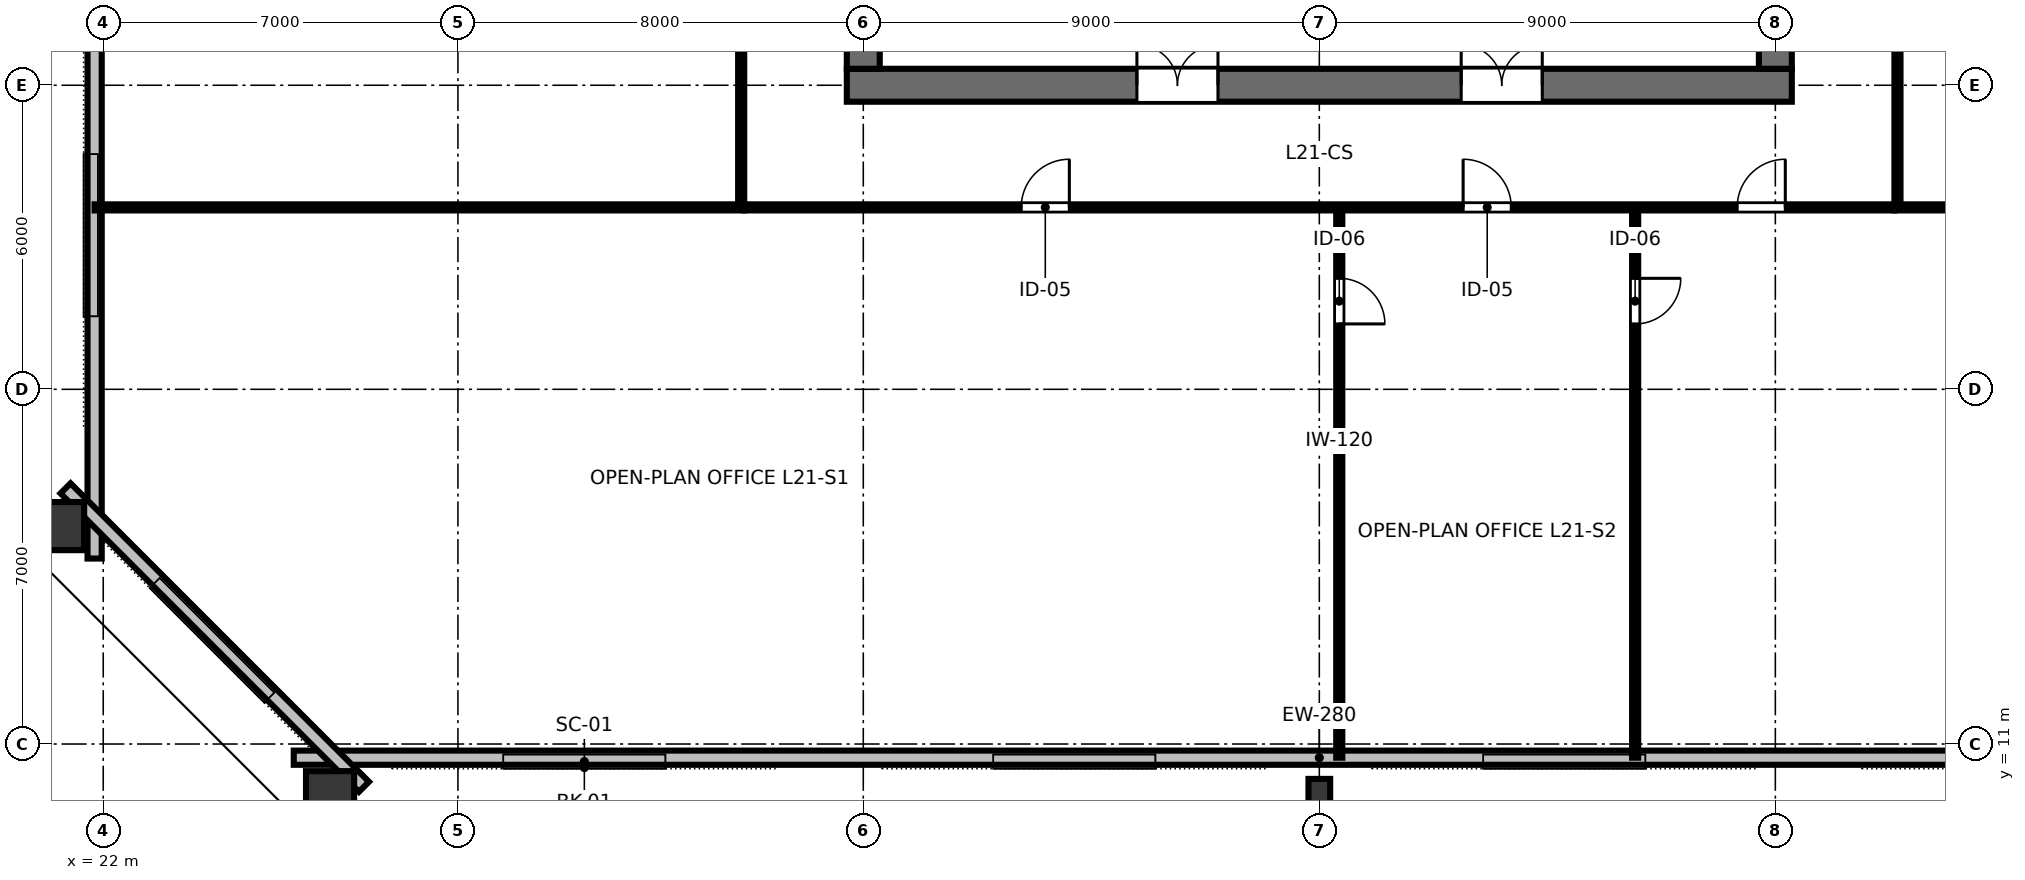
"""IFC4 building model, lengths in metres.
Left out: names, types, materials, properties, quantities, classifications, styles, units other than length and angle.
Written with IfcOpenShell. Run it as: python <this file> out.ifc"""

import sys

from ifc_helpers import new_model, si_unit, direction, frame, frame_2d, origin, origin_2d, place, context, subcontext, project, spatial, rectangle, hollow_rectangle, i_section, extrude, element, fill, save


model = new_model("IFC4")
c1 = context("Model", 3, precision=1e-05, world=origin(), true_north=direction((0.0, 1.0)))
c2 = subcontext(c1, "Body", "Model", "MODEL_VIEW")
j1 = project(units=[si_unit("LENGTHUNIT", "METRE"), si_unit("PLANEANGLEUNIT", "RADIAN")], contexts=[c1])
p1 = place(None, origin())
s1 = spatial("IfcSite", under=j1, at=p1, CompositionType="ELEMENT")
p2 = place(p1, origin())
s2 = spatial("IfcBuilding", under=s1, at=p2, CompositionType="ELEMENT")
p3 = place(p2, frame((0.0, 0.0, 82.0)))
s3 = spatial("IfcBuildingStorey", under=s2, at=p3, CompositionType="ELEMENT", Elevation=82.0)
p4 = place(p3, frame((36.675, 24.0, 0.0), z_axis=(0.0, 0.0, 1.0), x_axis=(1.0, 0.0, 0.0)))
e1 = element("IfcWall", 1, at=p4, inside=s3, PredefinedType="SHEAR", context=c2, shape_type="SweptSolid", body=[
    extrude(rectangle(XDim=18.65, YDim=0.65, at=frame_2d((9.325, 0.0))), origin(), (0.0, 0.0, 1.0), 3.28),
])
p5 = place(p4, frame((5.725, 0.0, 0.0)))
e2 = element("IfcOpeningElement", 2, at=p5, cuts=e1, PredefinedType="OPENING", context=c2, shape_type="SweptSolid", body=[
    extrude(rectangle(XDim=1.6, YDim=2.15, at=frame_2d((0.8, 1.075))), frame((0.0, 0.335, 0.0), z_axis=(0.0, -1.0, 0.0), x_axis=(1.0, 0.0, 0.0)), (0.0, 0.0, 1.0), 0.67),
])
p6 = place(p4, frame((12.125, 0.0, 0.0)))
e3 = element("IfcOpeningElement", 3, at=p6, cuts=e1, PredefinedType="OPENING", context=c2, shape_type="SweptSolid", body=[
    extrude(rectangle(XDim=1.6, YDim=2.15, at=frame_2d((0.8, 1.075))), frame((0.0, 0.335, 0.0), z_axis=(0.0, -1.0, 0.0), x_axis=(1.0, 0.0, 0.0)), (0.0, 0.0, 1.0), 0.67),
])
p7 = place(p3, frame((37.0, 24.325, 0.0), z_axis=(0.0, 0.0, 1.0), x_axis=(0.0, 1.0, 0.0)))
e4 = element("IfcWall", 4, at=p7, inside=s3, PredefinedType="SHEAR", context=c2, shape_type="SweptSolid", body=[
    extrude(rectangle(XDim=15.35, YDim=0.65, at=frame_2d((7.675, 0.0))), origin(), (0.0, 0.0, 1.0), 3.28),
])
p8 = place(p7, frame((5.2, 0.0, 0.0)))
e5 = element("IfcOpeningElement", 5, at=p8, cuts=e4, PredefinedType="OPENING", context=c2, shape_type="SweptSolid", body=[
    extrude(rectangle(XDim=1.15, YDim=2.15, at=frame_2d((0.575, 1.075))), frame((0.0, 0.335, 0.0), z_axis=(0.0, -1.0, 0.0), x_axis=(1.0, 0.0, 0.0)), (0.0, 0.0, 1.0), 0.67),
])
p9 = place(p3, frame((55.0, 24.325, 0.0), z_axis=(0.0, 0.0, 1.0), x_axis=(0.0, 1.0, 0.0)))
e6 = element("IfcWall", 6, at=p9, inside=s3, PredefinedType="SHEAR", context=c2, shape_type="SweptSolid", body=[
    extrude(rectangle(XDim=15.35, YDim=0.65, at=frame_2d((7.675, 0.0))), origin(), (0.0, 0.0, 1.0), 3.28),
])
p10 = place(p9, frame((5.2, 0.0, 0.0)))
e7 = element("IfcOpeningElement", 7, at=p10, cuts=e6, PredefinedType="OPENING", context=c2, shape_type="SweptSolid", body=[
    extrude(rectangle(XDim=1.15, YDim=2.15, at=frame_2d((0.575, 1.075))), frame((0.0, 0.335, 0.0), z_axis=(0.0, -1.0, 0.0), x_axis=(1.0, 0.0, 0.0)), (0.0, 0.0, 1.0), 0.67),
])
p11 = place(p3, frame((26.477, 9.89, 0.0), z_axis=(0.080491878848, 0.056033020634, 0.99517905828), x_axis=(-0.571330166379, 0.82072031837, 0.0)))
e8 = element("IfcColumn", 8, at=p11, inside=s3, PredefinedType="COLUMN", context=c2, shape_type="SweptSolid", body=[
    extrude(hollow_rectangle(XDim=0.95, YDim=1.15, WallThickness=0.06, at=origin_2d()), origin(), (0.0, 0.0, 1.0), 3.294),
])
p12 = place(p3, frame((46.0, 10.07, 0.0), z_axis=(0.0, 0.055844793021, 0.998439461907), x_axis=(-1.0, 0.0, 0.0)))
e9 = element("IfcColumn", 9, at=p12, inside=s3, PredefinedType="COLUMN", context=c2, shape_type="SweptSolid", body=[
    extrude(i_section(OverallWidth=0.428, OverallDepth=0.483, WebThickness=0.051, FlangeThickness=0.082, FilletRadius=0.025, at=origin_2d()), origin(), (0.0, 0.0, 1.0), 3.283),
])
p13 = place(p3, frame((21.048, 15.301, 0.0), z_axis=(0.066122964366, 0.070348310744, 0.995328523031), x_axis=(-0.6816861236, -0.725246783964, 0.096546005827)))
e10 = element("IfcColumn", 10, at=p13, inside=s3, PredefinedType="COLUMN", context=c2, shape_type="SweptSolid", body=[
    extrude(hollow_rectangle(XDim=0.95, YDim=1.15, WallThickness=0.06, at=origin_2d()), origin(), (0.0, 0.0, 1.0), 3.293),
])
p14 = place(p3, frame((25.76, 10.73, 0.0), z_axis=(0.0, 0.0, 1.0), x_axis=(1.0, 0.0, 0.0)))
e11 = element("IfcWall", 11, at=p14, inside=s3, PredefinedType="STANDARD", context=c2, shape_type="SweptSolid", body=[
    extrude(rectangle(XDim=40.48, YDim=0.28, at=frame_2d((20.24, 0.0))), origin(), (0.0, 0.0, 1.0), 3.28),
])
p15 = place(p3, frame((21.83, 49.34, 0.0), z_axis=(0.0, 0.0, 1.0), x_axis=(0.0, -1.0, 0.0)))
e12 = element("IfcWall", 12, at=p15, inside=s3, PredefinedType="STANDARD", context=c2, shape_type="SweptSolid", body=[
    extrude(rectangle(XDim=34.68, YDim=0.28, at=frame_2d((17.34, 0.0))), origin(), (0.0, 0.0, 1.0), 3.28),
])
p16 = place(p3, frame((21.256, 16.045, 0.0), z_axis=(0.0, 0.0, 1.0), x_axis=(0.707106781187, -0.707106781187, 0.0)))
e13 = element("IfcWall", 13, at=p16, inside=s3, PredefinedType="STANDARD", context=c2, shape_type="SweptSolid", body=[
    extrude(rectangle(XDim=8.329, YDim=0.28, at=frame_2d((4.165, 0.0))), origin(), (0.0, 0.0, 1.0), 2.343),
])
p17 = place(p3, frame((46.394, 21.59, 0.0), z_axis=(0.0, 0.0, 1.0), x_axis=(0.0, -1.0, 0.0)))
e14 = element("IfcWall", 14, at=p17, inside=s3, PredefinedType="PARTITIONING", context=c2, shape_type="SweptSolid", body=[
    extrude(rectangle(XDim=10.86, YDim=0.12, at=frame_2d((5.43, 0.0))), origin(), (0.0, 0.0, 1.0), 2.56),
])
p18 = place(p17, frame((1.4, 0.0, 0.0)))
e15 = element("IfcOpeningElement", 15, at=p18, cuts=e14, PredefinedType="OPENING", context=c2, shape_type="SweptSolid", body=[
    extrude(rectangle(XDim=0.9, YDim=2.15, at=frame_2d((0.45, 1.075))), frame((0.0, 0.07, 0.0), z_axis=(0.0, -1.0, 0.0), x_axis=(1.0, 0.0, 0.0)), (0.0, 0.0, 1.0), 0.14),
])
p19 = place(p3, frame((52.233, 21.59, 0.0), z_axis=(0.0, 0.0, 1.0), x_axis=(0.0, -1.0, 0.0)))
e16 = element("IfcWall", 16, at=p19, inside=s3, PredefinedType="PARTITIONING", context=c2, shape_type="SweptSolid", body=[
    extrude(rectangle(XDim=10.86, YDim=0.12, at=frame_2d((5.43, 0.0))), origin(), (0.0, 0.0, 1.0), 2.56),
])
p20 = place(p19, frame((1.4, 0.0, 0.0)))
e17 = element("IfcOpeningElement", 17, at=p20, cuts=e16, PredefinedType="OPENING", context=c2, shape_type="SweptSolid", body=[
    extrude(rectangle(XDim=0.9, YDim=2.15, at=frame_2d((0.45, 1.075))), frame((0.0, 0.07, 0.0), z_axis=(0.0, -1.0, 0.0), x_axis=(1.0, 0.0, 0.0)), (0.0, 0.0, 1.0), 0.14),
])
p21 = place(p3, frame((34.65, 21.59, 0.0), z_axis=(0.0, 0.0, 1.0), x_axis=(1.0, 0.0, 0.0)))
e18 = element("IfcWall", 18, at=p21, inside=s3, PredefinedType="PARTITIONING", context=c2, shape_type="SweptSolid", body=[
    extrude(rectangle(XDim=22.7, YDim=0.12, at=frame_2d((11.35, 0.0))), origin(), (0.0, 0.0, 1.0), 2.56),
])
p22 = place(p21, frame((5.467, 0.0, 0.0)))
e19 = element("IfcOpeningElement", 19, at=p22, cuts=e18, PredefinedType="OPENING", context=c2, shape_type="SweptSolid", body=[
    extrude(rectangle(XDim=0.95, YDim=2.15, at=frame_2d((0.475, 1.075))), frame((0.0, 0.07, 0.0), z_axis=(0.0, -1.0, 0.0), x_axis=(1.0, 0.0, 0.0)), (0.0, 0.0, 1.0), 0.14),
])
p23 = place(p21, frame((14.188, 0.0, 0.0)))
e20 = element("IfcOpeningElement", 20, at=p23, cuts=e18, PredefinedType="OPENING", context=c2, shape_type="SweptSolid", body=[
    extrude(rectangle(XDim=0.95, YDim=2.15, at=frame_2d((0.475, 1.075))), frame((0.0, 0.07, 0.0), z_axis=(0.0, -1.0, 0.0), x_axis=(1.0, 0.0, 0.0)), (0.0, 0.0, 1.0), 0.14),
])
p24 = place(p21, frame((19.596, 0.0, 0.0)))
e21 = element("IfcOpeningElement", 21, at=p24, cuts=e18, PredefinedType="OPENING", context=c2, shape_type="SweptSolid", body=[
    extrude(rectangle(XDim=0.95, YDim=2.15, at=frame_2d((0.475, 1.075))), frame((0.0, 0.07, 0.0), z_axis=(0.0, -1.0, 0.0), x_axis=(1.0, 0.0, 0.0)), (0.0, 0.0, 1.0), 0.14),
])
p25 = place(p3, frame((34.59, 21.65, 0.0), z_axis=(0.0, 0.0, 1.0), x_axis=(0.0, 1.0, 0.0)))
e22 = element("IfcWall", 22, at=p25, inside=s3, PredefinedType="PARTITIONING", context=c2, shape_type="SweptSolid", body=[
    extrude(rectangle(XDim=20.7, YDim=0.12, at=frame_2d((10.35, 0.0))), origin(), (0.0, 0.0, 1.0), 2.56),
])
p26 = place(p25, frame((9.875, 0.0, 0.0)))
e23 = element("IfcOpeningElement", 23, at=p26, cuts=e22, PredefinedType="OPENING", context=c2, shape_type="SweptSolid", body=[
    extrude(rectangle(XDim=0.95, YDim=2.15, at=frame_2d((0.475, 1.075))), frame((0.0, 0.07, 0.0), z_axis=(0.0, -1.0, 0.0), x_axis=(1.0, 0.0, 0.0)), (0.0, 0.0, 1.0), 0.14),
])
p27 = place(p3, frame((57.41, 21.65, 0.0), z_axis=(0.0, 0.0, 1.0), x_axis=(0.0, 1.0, 0.0)))
e24 = element("IfcWall", 24, at=p27, inside=s3, PredefinedType="PARTITIONING", context=c2, shape_type="SweptSolid", body=[
    extrude(rectangle(XDim=20.7, YDim=0.12, at=frame_2d((10.35, 0.0))), origin(), (0.0, 0.0, 1.0), 2.56),
])
p28 = place(p27, frame((6.128, 0.0, 0.0)))
e25 = element("IfcOpeningElement", 25, at=p28, cuts=e24, PredefinedType="OPENING", context=c2, shape_type="SweptSolid", body=[
    extrude(rectangle(XDim=0.95, YDim=2.15, at=frame_2d((0.475, 1.075))), frame((0.0, 0.07, 0.0), z_axis=(0.0, -1.0, 0.0), x_axis=(1.0, 0.0, 0.0)), (0.0, 0.0, 1.0), 0.14),
])
p29 = place(p27, frame((16.278, 0.0, 0.0)))
e26 = element("IfcOpeningElement", 26, at=p29, cuts=e24, PredefinedType="OPENING", context=c2, shape_type="SweptSolid", body=[
    extrude(rectangle(XDim=0.95, YDim=2.15, at=frame_2d((0.475, 1.075))), frame((0.0, 0.07, 0.0), z_axis=(0.0, -1.0, 0.0), x_axis=(1.0, 0.0, 0.0)), (0.0, 0.0, 1.0), 0.14),
])
for number, where, z_axis, x_axis in (
    (27, (34.65, 21.59, 0.0), (0.0, 0.0, 1.0), (-1.0, 0.0, 0.0)),
    (28, (57.35, 21.59, 0.0), (0.0, 0.0, 1.0), (1.0, 0.0, 0.0)),
):
    element("IfcWall", number, at=place(p3, frame(where, z_axis=z_axis, x_axis=x_axis)), inside=s3, PredefinedType="PARTITIONING", context=c2, shape_type="SweptSolid", body=[
        extrude(rectangle(XDim=12.82, YDim=0.12, at=frame_2d((6.41, 0.0))), origin(), (0.0, 0.0, 1.0), 2.56),
    ])
p30 = place(p5, origin())
e29 = element("IfcDoor", 29, at=p30, inside=s3, OperationType="DOUBLE_DOOR_SINGLE_SWING", PredefinedType="DOOR", context=c2, shape_type="SweptSolid", body=[
    extrude(rectangle(XDim=1.6, YDim=2.15, at=frame_2d((0.8, 1.075))), frame((0.0, 0.025, 0.0), z_axis=(0.0, -1.0, 0.0), x_axis=(1.0, 0.0, 0.0)), (0.0, 0.0, 1.0), 0.05),
])
fill(e2, e29)
p31 = place(p6, origin())
e30 = element("IfcDoor", 30, at=p31, inside=s3, OperationType="DOUBLE_DOOR_SINGLE_SWING", PredefinedType="DOOR", context=c2, shape_type="SweptSolid", body=[
    extrude(rectangle(XDim=1.6, YDim=2.15, at=frame_2d((0.8, 1.075))), frame((0.0, 0.025, 0.0), z_axis=(0.0, -1.0, 0.0), x_axis=(1.0, 0.0, 0.0)), (0.0, 0.0, 1.0), 0.05),
])
fill(e3, e30)
p32 = place(p18, origin())
e31 = element("IfcDoor", 31, at=p32, inside=s3, OperationType="SINGLE_SWING_RIGHT", PredefinedType="DOOR", context=c2, shape_type="SweptSolid", body=[
    extrude(rectangle(XDim=0.9, YDim=2.15, at=frame_2d((0.45, 1.075))), frame((0.0, 0.025, 0.0), z_axis=(0.0, -1.0, 0.0), x_axis=(1.0, 0.0, 0.0)), (0.0, 0.0, 1.0), 0.05),
])
fill(e15, e31)
p33 = place(p20, origin())
e32 = element("IfcDoor", 32, at=p33, inside=s3, OperationType="SINGLE_SWING_LEFT", PredefinedType="DOOR", context=c2, shape_type="SweptSolid", body=[
    extrude(rectangle(XDim=0.9, YDim=2.15, at=frame_2d((0.45, 1.075))), frame((0.0, 0.025, 0.0), z_axis=(0.0, -1.0, 0.0), x_axis=(1.0, 0.0, 0.0)), (0.0, 0.0, 1.0), 0.05),
])
fill(e17, e32)
p34 = place(p22, origin())
e33 = element("IfcDoor", 33, at=p34, inside=s3, OperationType="SINGLE_SWING_RIGHT", PredefinedType="DOOR", context=c2, shape_type="SweptSolid", body=[
    extrude(rectangle(XDim=0.95, YDim=2.15, at=frame_2d((0.475, 1.075))), frame((0.0, 0.025, 0.0), z_axis=(0.0, -1.0, 0.0), x_axis=(1.0, 0.0, 0.0)), (0.0, 0.0, 1.0), 0.05),
])
fill(e19, e33)
p35 = place(p23, origin())
e34 = element("IfcDoor", 34, at=p35, inside=s3, OperationType="SINGLE_SWING_LEFT", PredefinedType="DOOR", context=c2, shape_type="SweptSolid", body=[
    extrude(rectangle(XDim=0.95, YDim=2.15, at=frame_2d((0.475, 1.075))), frame((0.0, 0.025, 0.0), z_axis=(0.0, -1.0, 0.0), x_axis=(1.0, 0.0, 0.0)), (0.0, 0.0, 1.0), 0.05),
])
fill(e20, e34)
p36 = place(p24, origin())
e35 = element("IfcDoor", 35, at=p36, inside=s3, OperationType="SINGLE_SWING_RIGHT", PredefinedType="DOOR", context=c2, shape_type="SweptSolid", body=[
    extrude(rectangle(XDim=0.95, YDim=2.15, at=frame_2d((0.475, 1.075))), frame((0.0, 0.025, 0.0), z_axis=(0.0, -1.0, 0.0), x_axis=(1.0, 0.0, 0.0)), (0.0, 0.0, 1.0), 0.05),
])
fill(e21, e35)
save(model, sys.argv[1])
